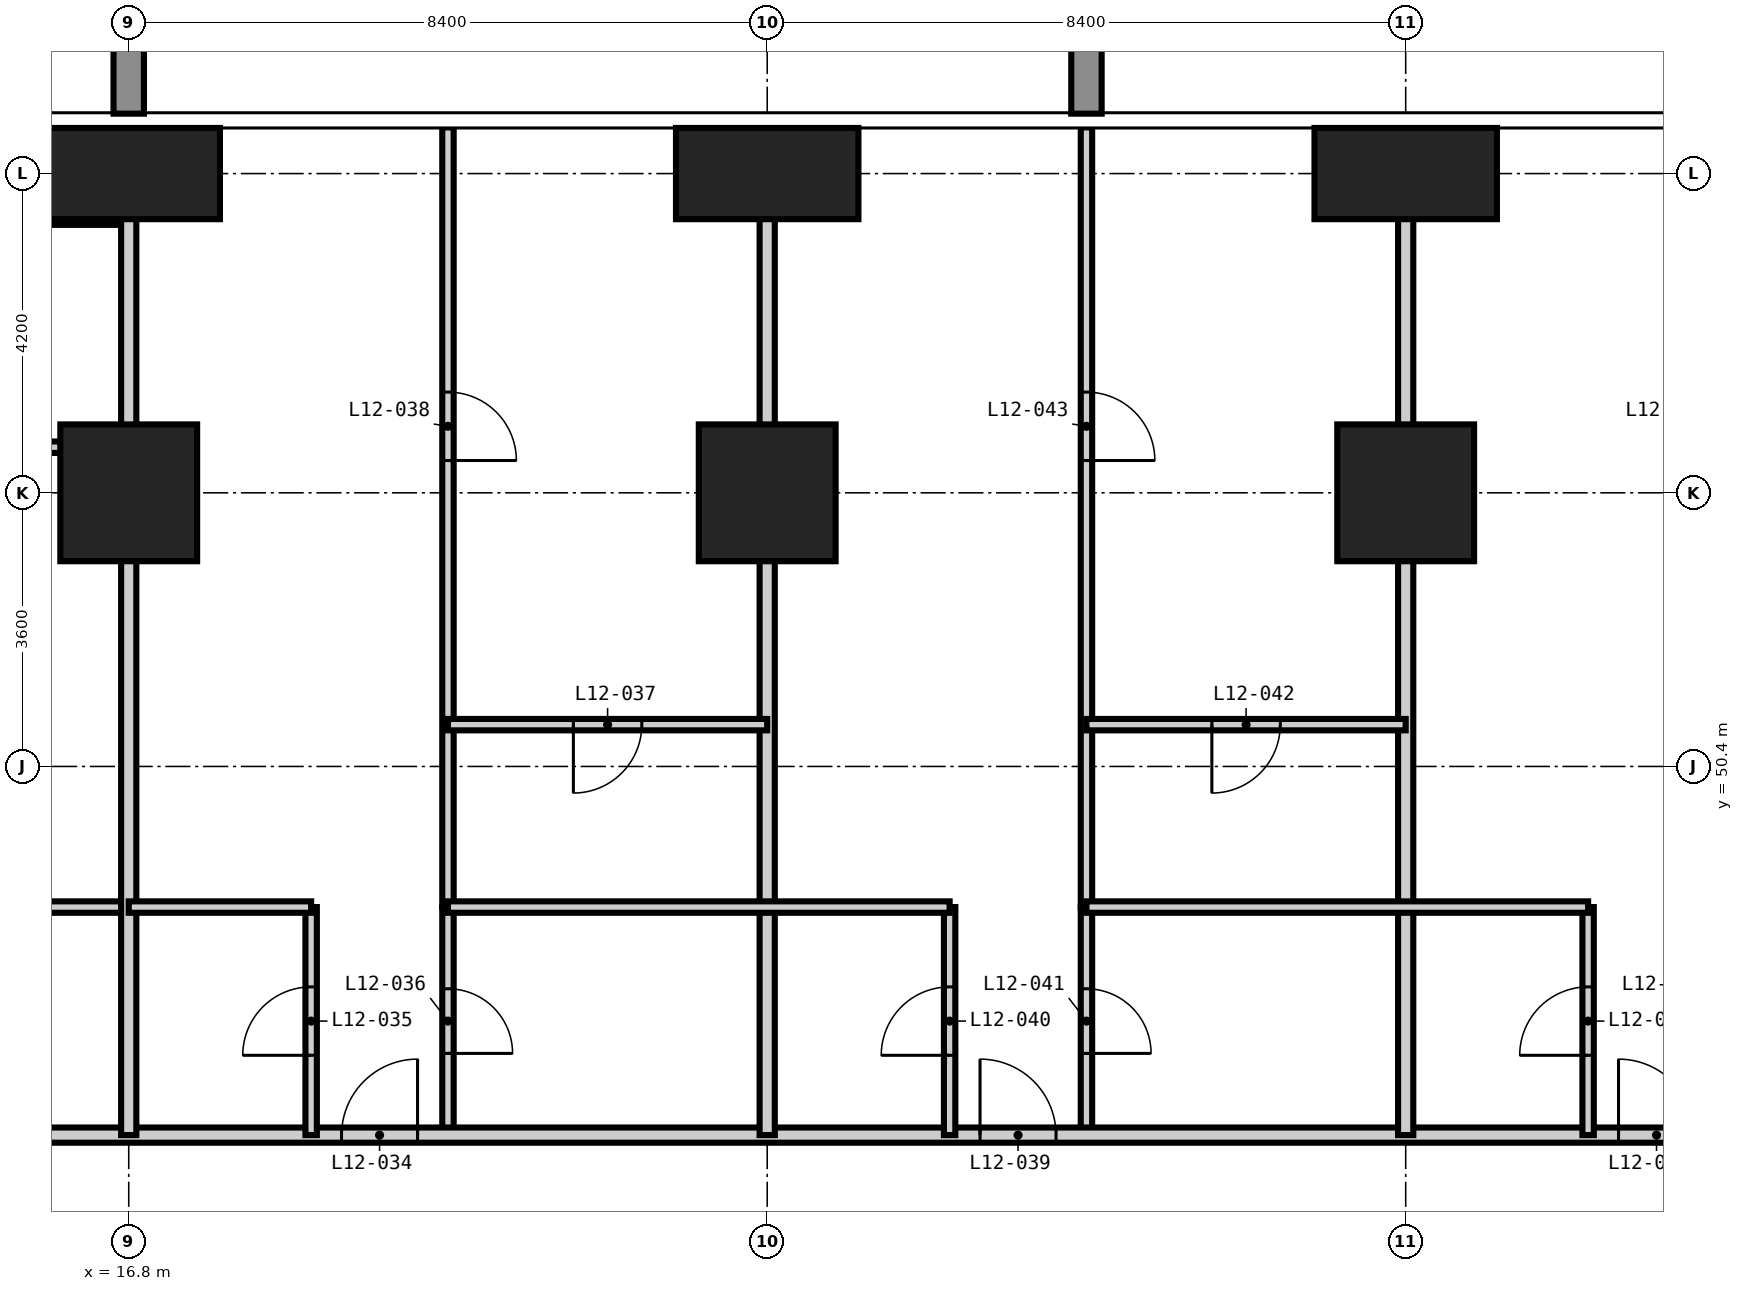
"""IFC4 building model, lengths in metres.
Left out: names, types, materials, properties, quantities, classifications, styles, units other than length and angle.
Written with IfcOpenShell. Run it as: python <this file> out.ifc"""

import sys

from ifc_helpers import new_model, si_unit, direction, frame, frame_2d, origin, origin_2d, place, context, subcontext, project, spatial, rectangle, extrude, element, fill, save


model = new_model("IFC4")
c1 = context("Model", 3, precision=1e-05, world=origin(), true_north=direction((0.0, 1.0)))
c2 = subcontext(c1, "Body", "Model", "MODEL_VIEW")
j1 = project(units=[si_unit("LENGTHUNIT", "METRE"), si_unit("PLANEANGLEUNIT", "RADIAN")], contexts=[c1])
p1 = place(None, origin())
s1 = spatial("IfcSite", under=j1, at=p1, CompositionType="ELEMENT")
p2 = place(p1, origin())
s2 = spatial("IfcBuilding", under=s1, at=p2, CompositionType="ELEMENT")
p3 = place(p2, frame((0.0, 0.0, 52.2)))
s3 = spatial("IfcBuildingStorey", under=s2, at=p3, CompositionType="ELEMENT", Elevation=52.2)
p4 = place(p3, frame((16.8, 54.0, -0.35), z_axis=(0.0, 0.0, 1.0), x_axis=(1.0, 0.0, 0.0)))
e1 = element("IfcColumn", 1, at=p4, inside=s3, PredefinedType="COLUMN", context=c2, shape_type="SweptSolid", body=[
    extrude(rectangle(XDim=1.8, YDim=1.8, at=origin_2d()), origin(), (0.0, 0.0, 1.0), 3.6),
])
p5 = place(p3, frame((16.8, 58.2, -0.35), z_axis=(0.0, 0.0, 1.0), x_axis=(1.0, 0.0, 0.0)))
e2 = element("IfcColumn", 2, at=p5, inside=s3, PredefinedType="COLUMN", context=c2, shape_type="SweptSolid", body=[
    extrude(rectangle(XDim=2.4, YDim=1.2, at=origin_2d()), origin(), (0.0, 0.0, 1.0), 3.6),
])
p6 = place(p3, frame((25.2, 54.0, -0.35), z_axis=(0.0, 0.0, 1.0), x_axis=(1.0, 0.0, 0.0)))
e3 = element("IfcColumn", 3, at=p6, inside=s3, PredefinedType="COLUMN", context=c2, shape_type="SweptSolid", body=[
    extrude(rectangle(XDim=1.8, YDim=1.8, at=origin_2d()), origin(), (0.0, 0.0, 1.0), 3.6),
])
p7 = place(p3, frame((25.2, 58.2, -0.35), z_axis=(0.0, 0.0, 1.0), x_axis=(1.0, 0.0, 0.0)))
e4 = element("IfcColumn", 4, at=p7, inside=s3, PredefinedType="COLUMN", context=c2, shape_type="SweptSolid", body=[
    extrude(rectangle(XDim=2.4, YDim=1.2, at=origin_2d()), origin(), (0.0, 0.0, 1.0), 3.6),
])
p8 = place(p3, frame((33.6, 54.0, -0.35), z_axis=(0.0, 0.0, 1.0), x_axis=(1.0, 0.0, 0.0)))
e5 = element("IfcColumn", 5, at=p8, inside=s3, PredefinedType="COLUMN", context=c2, shape_type="SweptSolid", body=[
    extrude(rectangle(XDim=1.8, YDim=1.8, at=origin_2d()), origin(), (0.0, 0.0, 1.0), 3.6),
])
p9 = place(p3, frame((33.6, 58.2, -0.35), z_axis=(0.0, 0.0, 1.0), x_axis=(1.0, 0.0, 0.0)))
e6 = element("IfcColumn", 6, at=p9, inside=s3, PredefinedType="COLUMN", context=c2, shape_type="SweptSolid", body=[
    extrude(rectangle(XDim=2.4, YDim=1.2, at=origin_2d()), origin(), (0.0, 0.0, 1.0), 3.6),
])
p10 = place(p3, frame((21.0, 45.55, 0.0), z_axis=(0.0, 0.0, 1.0), x_axis=(0.0, 1.0, 0.0)))
e7 = element("IfcWall", 7, at=p10, inside=s3, PredefinedType="PARTITIONING", context=c2, shape_type="SweptSolid", body=[
    extrude(rectangle(XDim=3.0, YDim=0.15, at=frame_2d((1.5, 0.0))), origin(), (0.0, 0.0, 1.0), 3.25),
])
p11 = place(p10, frame((1.075, 0.0, 0.0)))
e8 = element("IfcOpeningElement", 8, at=p11, cuts=e7, PredefinedType="OPENING", context=c2, shape_type="SweptSolid", body=[
    extrude(rectangle(XDim=0.85, YDim=2.1, at=frame_2d((0.425, 1.05))), frame((0.0, 0.085, 0.0), z_axis=(0.0, -1.0, 0.0), x_axis=(1.0, 0.0, 0.0)), (0.0, 0.0, 1.0), 0.17),
])
p12 = place(p3, frame((29.4, 45.55, 0.0), z_axis=(0.0, 0.0, 1.0), x_axis=(0.0, 1.0, 0.0)))
e9 = element("IfcWall", 9, at=p12, inside=s3, PredefinedType="PARTITIONING", context=c2, shape_type="SweptSolid", body=[
    extrude(rectangle(XDim=3.0, YDim=0.15, at=frame_2d((1.5, 0.0))), origin(), (0.0, 0.0, 1.0), 3.25),
])
p13 = place(p12, frame((1.075, 0.0, 0.0)))
e10 = element("IfcOpeningElement", 10, at=p13, cuts=e9, PredefinedType="OPENING", context=c2, shape_type="SweptSolid", body=[
    extrude(rectangle(XDim=0.85, YDim=2.1, at=frame_2d((0.425, 1.05))), frame((0.0, 0.085, 0.0), z_axis=(0.0, -1.0, 0.0), x_axis=(1.0, 0.0, 0.0)), (0.0, 0.0, 1.0), 0.17),
])
p14 = place(p3, frame((12.65, 48.55, 0.0), z_axis=(0.0, 0.0, 1.0), x_axis=(1.0, 0.0, 0.0)))
e11 = element("IfcWall", 11, at=p14, inside=s3, PredefinedType="PARTITIONING", context=c2, shape_type="SweptSolid", body=[
    extrude(rectangle(XDim=4.15, YDim=0.15, at=frame_2d((2.075, 0.0))), origin(), (0.0, 0.0, 1.0), 3.25),
])
p15 = place(p14, frame((1.65, 0.0, 0.0)))
e12 = element("IfcOpeningElement", 12, at=p15, cuts=e11, PredefinedType="OPENING", context=c2, shape_type="SweptSolid", body=[
    extrude(rectangle(XDim=0.85, YDim=2.1, at=frame_2d((0.425, 1.05))), frame((0.0, 0.085, 0.0), z_axis=(0.0, -1.0, 0.0), x_axis=(1.0, 0.0, 0.0)), (0.0, 0.0, 1.0), 0.17),
])
p16 = place(p3, frame((13.2, 57.6, 0.0), z_axis=(0.0, 0.0, 1.0), x_axis=(1.0, 0.0, 0.0)))
e13 = element("IfcWall", 13, at=p16, inside=s3, PredefinedType="PARTITIONING", context=c2, shape_type="SweptSolid", body=[
    extrude(rectangle(XDim=3.6, YDim=0.15, at=frame_2d((1.8, 0.0))), origin(), (0.0, 0.0, 1.0), 3.25),
])
p17 = place(p16, frame((1.375, 0.0, 0.0)))
e14 = element("IfcOpeningElement", 14, at=p17, cuts=e13, PredefinedType="OPENING", context=c2, shape_type="SweptSolid", body=[
    extrude(rectangle(XDim=0.85, YDim=2.1, at=frame_2d((0.425, 1.05))), frame((0.0, 0.085, 0.0), z_axis=(0.0, -1.0, 0.0), x_axis=(1.0, 0.0, 0.0)), (0.0, 0.0, 1.0), 0.17),
])
p18 = place(p3, frame((12.65, 45.55, 0.0), z_axis=(0.0, 0.0, 1.0), x_axis=(1.0, 0.0, 0.0)))
e15 = element("IfcWall", 15, at=p18, inside=s3, PredefinedType="PARTITIONING", context=c2, shape_type="SweptSolid", body=[
    extrude(rectangle(XDim=32.3, YDim=0.2, at=frame_2d((16.15, 0.0))), origin(), (0.0, 0.0, 1.0), 3.25),
])
p19 = place(p18, frame((6.95, 0.0, 0.0)))
e16 = element("IfcOpeningElement", 16, at=p19, cuts=e15, PredefinedType="OPENING", context=c2, shape_type="SweptSolid", body=[
    extrude(rectangle(XDim=1.0, YDim=2.2, at=frame_2d((0.5, 1.1))), frame((0.0, 0.11, 0.0), z_axis=(0.0, -1.0, 0.0), x_axis=(1.0, 0.0, 0.0)), (0.0, 0.0, 1.0), 0.22),
])
p20 = place(p18, frame((15.35, 0.0, 0.0)))
e17 = element("IfcOpeningElement", 17, at=p20, cuts=e15, PredefinedType="OPENING", context=c2, shape_type="SweptSolid", body=[
    extrude(rectangle(XDim=1.0, YDim=2.2, at=frame_2d((0.5, 1.1))), frame((0.0, 0.11, 0.0), z_axis=(0.0, -1.0, 0.0), x_axis=(1.0, 0.0, 0.0)), (0.0, 0.0, 1.0), 0.22),
])
p21 = place(p18, frame((23.75, 0.0, 0.0)))
e18 = element("IfcOpeningElement", 18, at=p21, cuts=e15, PredefinedType="OPENING", context=c2, shape_type="SweptSolid", body=[
    extrude(rectangle(XDim=1.0, YDim=2.2, at=frame_2d((0.5, 1.1))), frame((0.0, 0.11, 0.0), z_axis=(0.0, -1.0, 0.0), x_axis=(1.0, 0.0, 0.0)), (0.0, 0.0, 1.0), 0.22),
])
for number, where, z_axis, x_axis in (
    (19, (16.8, 45.55, 0.0), (0.0, 0.0, 1.0), (0.0, 1.0, 0.0)),
    (20, (25.2, 45.55, 0.0), (0.0, 0.0, 1.0), (0.0, 1.0, 0.0)),
    (21, (33.6, 45.55, 0.0), (0.0, 0.0, 1.0), (0.0, 1.0, 0.0)),
):
    element("IfcWall", number, at=place(p3, frame(where, z_axis=z_axis, x_axis=x_axis)), inside=s3, PredefinedType="PARTITIONING", context=c2, shape_type="SweptSolid", body=[
        extrude(rectangle(XDim=13.258, YDim=0.2, at=frame_2d((6.629, 0.0))), origin(), (0.0, 0.0, 1.0), 3.25),
    ])
p22 = place(p3, frame((19.2, 45.55, 0.0), z_axis=(0.0, 0.0, 1.0), x_axis=(0.0, 1.0, 0.0)))
e22 = element("IfcWall", 22, at=p22, inside=s3, PredefinedType="PARTITIONING", context=c2, shape_type="SweptSolid", body=[
    extrude(rectangle(XDim=3.0, YDim=0.15, at=frame_2d((1.5, 0.0))), origin(), (0.0, 0.0, 1.0), 3.25),
])
p23 = place(p22, frame((1.05, 0.0, 0.0)))
e23 = element("IfcOpeningElement", 23, at=p23, cuts=e22, PredefinedType="OPENING", context=c2, shape_type="SweptSolid", body=[
    extrude(rectangle(XDim=0.9, YDim=2.1, at=frame_2d((0.45, 1.05))), frame((0.0, 0.085, 0.0), z_axis=(0.0, -1.0, 0.0), x_axis=(1.0, 0.0, 0.0)), (0.0, 0.0, 1.0), 0.17),
])
p24 = place(p3, frame((21.0, 48.55, 0.0), z_axis=(0.0, 0.0, 1.0), x_axis=(0.0, 1.0, 0.0)))
e24 = element("IfcWall", 24, at=p24, inside=s3, PredefinedType="PARTITIONING", context=c2, shape_type="SweptSolid", body=[
    extrude(rectangle(XDim=10.258, YDim=0.15, at=frame_2d((5.129, 0.0))), origin(), (0.0, 0.0, 1.0), 3.25),
])
p25 = place(p24, frame((5.875, 0.0, 0.0)))
e25 = element("IfcOpeningElement", 25, at=p25, cuts=e24, PredefinedType="OPENING", context=c2, shape_type="SweptSolid", body=[
    extrude(rectangle(XDim=0.9, YDim=2.1, at=frame_2d((0.45, 1.05))), frame((0.0, 0.085, 0.0), z_axis=(0.0, -1.0, 0.0), x_axis=(1.0, 0.0, 0.0)), (0.0, 0.0, 1.0), 0.17),
])
p26 = place(p3, frame((27.6, 45.55, 0.0), z_axis=(0.0, 0.0, 1.0), x_axis=(0.0, 1.0, 0.0)))
e26 = element("IfcWall", 26, at=p26, inside=s3, PredefinedType="PARTITIONING", context=c2, shape_type="SweptSolid", body=[
    extrude(rectangle(XDim=3.0, YDim=0.15, at=frame_2d((1.5, 0.0))), origin(), (0.0, 0.0, 1.0), 3.25),
])
p27 = place(p26, frame((1.05, 0.0, 0.0)))
e27 = element("IfcOpeningElement", 27, at=p27, cuts=e26, PredefinedType="OPENING", context=c2, shape_type="SweptSolid", body=[
    extrude(rectangle(XDim=0.9, YDim=2.1, at=frame_2d((0.45, 1.05))), frame((0.0, 0.085, 0.0), z_axis=(0.0, -1.0, 0.0), x_axis=(1.0, 0.0, 0.0)), (0.0, 0.0, 1.0), 0.17),
])
p28 = place(p3, frame((29.4, 48.55, 0.0), z_axis=(0.0, 0.0, 1.0), x_axis=(0.0, 1.0, 0.0)))
e28 = element("IfcWall", 28, at=p28, inside=s3, PredefinedType="PARTITIONING", context=c2, shape_type="SweptSolid", body=[
    extrude(rectangle(XDim=10.258, YDim=0.15, at=frame_2d((5.129, 0.0))), origin(), (0.0, 0.0, 1.0), 3.25),
])
p29 = place(p28, frame((5.875, 0.0, 0.0)))
e29 = element("IfcOpeningElement", 29, at=p29, cuts=e28, PredefinedType="OPENING", context=c2, shape_type="SweptSolid", body=[
    extrude(rectangle(XDim=0.9, YDim=2.1, at=frame_2d((0.45, 1.05))), frame((0.0, 0.085, 0.0), z_axis=(0.0, -1.0, 0.0), x_axis=(1.0, 0.0, 0.0)), (0.0, 0.0, 1.0), 0.17),
])
p30 = place(p3, frame((36.0, 45.55, 0.0), z_axis=(0.0, 0.0, 1.0), x_axis=(0.0, 1.0, 0.0)))
e30 = element("IfcWall", 30, at=p30, inside=s3, PredefinedType="PARTITIONING", context=c2, shape_type="SweptSolid", body=[
    extrude(rectangle(XDim=3.0, YDim=0.15, at=frame_2d((1.5, 0.0))), origin(), (0.0, 0.0, 1.0), 3.25),
])
p31 = place(p30, frame((1.05, 0.0, 0.0)))
e31 = element("IfcOpeningElement", 31, at=p31, cuts=e30, PredefinedType="OPENING", context=c2, shape_type="SweptSolid", body=[
    extrude(rectangle(XDim=0.9, YDim=2.1, at=frame_2d((0.45, 1.05))), frame((0.0, 0.085, 0.0), z_axis=(0.0, -1.0, 0.0), x_axis=(1.0, 0.0, 0.0)), (0.0, 0.0, 1.0), 0.17),
])
p32 = place(p3, frame((16.8, 48.55, 0.0), z_axis=(0.0, 0.0, 1.0), x_axis=(1.0, 0.0, 0.0)))
e32 = element("IfcWall", 32, at=p32, inside=s3, PredefinedType="PARTITIONING", context=c2, shape_type="SweptSolid", body=[
    extrude(rectangle(XDim=2.4, YDim=0.15, at=frame_2d((1.2, 0.0))), origin(), (0.0, 0.0, 1.0), 3.25),
])
for number, where, z_axis, x_axis in (
    (33, (21.0, 48.55, 0.0), (0.0, 0.0, 1.0), (1.0, 0.0, 0.0)),
    (34, (29.4, 48.55, 0.0), (0.0, 0.0, 1.0), (1.0, 0.0, 0.0)),
):
    element("IfcWall", number, at=place(p3, frame(where, z_axis=z_axis, x_axis=x_axis)), inside=s3, PredefinedType="PARTITIONING", context=c2, shape_type="SweptSolid", body=[
        extrude(rectangle(XDim=6.6, YDim=0.15, at=frame_2d((3.3, 0.0))), origin(), (0.0, 0.0, 1.0), 3.25),
    ])
p33 = place(p3, frame((21.0, 50.95, 0.0), z_axis=(0.0, 0.0, 1.0), x_axis=(1.0, 0.0, 0.0)))
e35 = element("IfcWall", 35, at=p33, inside=s3, PredefinedType="PARTITIONING", context=c2, shape_type="SweptSolid", body=[
    extrude(rectangle(XDim=4.2, YDim=0.15, at=frame_2d((2.1, 0.0))), origin(), (0.0, 0.0, 1.0), 3.25),
])
p34 = place(p33, frame((1.65, 0.0, 0.0)))
e36 = element("IfcOpeningElement", 36, at=p34, cuts=e35, PredefinedType="OPENING", context=c2, shape_type="SweptSolid", body=[
    extrude(rectangle(XDim=0.9, YDim=2.1, at=frame_2d((0.45, 1.05))), frame((0.0, 0.085, 0.0), z_axis=(0.0, -1.0, 0.0), x_axis=(1.0, 0.0, 0.0)), (0.0, 0.0, 1.0), 0.17),
])
p35 = place(p3, frame((29.4, 50.95, 0.0), z_axis=(0.0, 0.0, 1.0), x_axis=(1.0, 0.0, 0.0)))
e37 = element("IfcWall", 37, at=p35, inside=s3, PredefinedType="PARTITIONING", context=c2, shape_type="SweptSolid", body=[
    extrude(rectangle(XDim=4.2, YDim=0.15, at=frame_2d((2.1, 0.0))), origin(), (0.0, 0.0, 1.0), 3.25),
])
p36 = place(p35, frame((1.65, 0.0, 0.0)))
e38 = element("IfcOpeningElement", 38, at=p36, cuts=e37, PredefinedType="OPENING", context=c2, shape_type="SweptSolid", body=[
    extrude(rectangle(XDim=0.9, YDim=2.1, at=frame_2d((0.45, 1.05))), frame((0.0, 0.085, 0.0), z_axis=(0.0, -1.0, 0.0), x_axis=(1.0, 0.0, 0.0)), (0.0, 0.0, 1.0), 0.17),
])
p37 = place(p3, frame((-0.008, 54.6, 0.0), z_axis=(0.0, 0.0, 1.0), x_axis=(1.0, 0.0, 0.0)))
e39 = element("IfcWall", 39, at=p37, inside=s3, PredefinedType="PARTITIONING", context=c2, shape_type="SweptSolid", body=[
    extrude(rectangle(XDim=16.808, YDim=0.15, at=frame_2d((8.404, 0.0))), origin(), (0.0, 0.0, 1.0), 3.25),
])
p38 = place(p37, frame((4.958, 0.0, 0.0)))
e40 = element("IfcOpeningElement", 40, at=p38, cuts=e39, PredefinedType="OPENING", context=c2, shape_type="SweptSolid", body=[
    extrude(rectangle(XDim=0.9, YDim=2.1, at=frame_2d((0.45, 1.05))), frame((0.0, 0.085, 0.0), z_axis=(0.0, -1.0, 0.0), x_axis=(1.0, 0.0, 0.0)), (0.0, 0.0, 1.0), 0.17),
])
p39 = place(p19, origin())
e41 = element("IfcDoor", 41, at=p39, inside=s3, OperationType="SINGLE_SWING_RIGHT", PredefinedType="DOOR", context=c2, shape_type="SweptSolid", body=[
    extrude(rectangle(XDim=1.0, YDim=2.2, at=frame_2d((0.5, 1.1))), frame((0.0, 0.025, 0.0), z_axis=(0.0, -1.0, 0.0), x_axis=(1.0, 0.0, 0.0)), (0.0, 0.0, 1.0), 0.05),
])
fill(e16, e41)
p40 = place(p23, origin())
e42 = element("IfcDoor", 42, at=p40, inside=s3, OperationType="SINGLE_SWING_LEFT", PredefinedType="DOOR", context=c2, shape_type="SweptSolid", body=[
    extrude(rectangle(XDim=0.9, YDim=2.1, at=frame_2d((0.45, 1.05))), frame((0.0, 0.025, 0.0), z_axis=(0.0, -1.0, 0.0), x_axis=(1.0, 0.0, 0.0)), (0.0, 0.0, 1.0), 0.05),
])
fill(e23, e42)
p41 = place(p11, frame((0.85, 0.0, 0.0), z_axis=(0.0, 0.0, 1.0), x_axis=(-1.0, 0.0, 0.0)))
e43 = element("IfcDoor", 43, at=p41, inside=s3, OperationType="SINGLE_SWING_RIGHT", PredefinedType="DOOR", context=c2, shape_type="SweptSolid", body=[
    extrude(rectangle(XDim=0.85, YDim=2.1, at=frame_2d((0.425, 1.05))), frame((0.0, 0.025, 0.0), z_axis=(0.0, -1.0, 0.0), x_axis=(1.0, 0.0, 0.0)), (0.0, 0.0, 1.0), 0.05),
])
fill(e8, e43)
p42 = place(p34, frame((0.9, 0.0, 0.0), z_axis=(0.0, 0.0, 1.0), x_axis=(-1.0, 0.0, 0.0)))
e44 = element("IfcDoor", 44, at=p42, inside=s3, OperationType="SINGLE_SWING_RIGHT", PredefinedType="DOOR", context=c2, shape_type="SweptSolid", body=[
    extrude(rectangle(XDim=0.9, YDim=2.1, at=frame_2d((0.45, 1.05))), frame((0.0, 0.025, 0.0), z_axis=(0.0, -1.0, 0.0), x_axis=(1.0, 0.0, 0.0)), (0.0, 0.0, 1.0), 0.05),
])
fill(e36, e44)
p43 = place(p25, frame((0.9, 0.0, 0.0), z_axis=(0.0, 0.0, 1.0), x_axis=(-1.0, 0.0, 0.0)))
e45 = element("IfcDoor", 45, at=p43, inside=s3, OperationType="SINGLE_SWING_RIGHT", PredefinedType="DOOR", context=c2, shape_type="SweptSolid", body=[
    extrude(rectangle(XDim=0.9, YDim=2.1, at=frame_2d((0.45, 1.05))), frame((0.0, 0.025, 0.0), z_axis=(0.0, -1.0, 0.0), x_axis=(1.0, 0.0, 0.0)), (0.0, 0.0, 1.0), 0.05),
])
fill(e25, e45)
p44 = place(p20, origin())
e46 = element("IfcDoor", 46, at=p44, inside=s3, OperationType="SINGLE_SWING_LEFT", PredefinedType="DOOR", context=c2, shape_type="SweptSolid", body=[
    extrude(rectangle(XDim=1.0, YDim=2.2, at=frame_2d((0.5, 1.1))), frame((0.0, 0.025, 0.0), z_axis=(0.0, -1.0, 0.0), x_axis=(1.0, 0.0, 0.0)), (0.0, 0.0, 1.0), 0.05),
])
fill(e17, e46)
p45 = place(p27, origin())
e47 = element("IfcDoor", 47, at=p45, inside=s3, OperationType="SINGLE_SWING_LEFT", PredefinedType="DOOR", context=c2, shape_type="SweptSolid", body=[
    extrude(rectangle(XDim=0.9, YDim=2.1, at=frame_2d((0.45, 1.05))), frame((0.0, 0.025, 0.0), z_axis=(0.0, -1.0, 0.0), x_axis=(1.0, 0.0, 0.0)), (0.0, 0.0, 1.0), 0.05),
])
fill(e27, e47)
p46 = place(p13, frame((0.85, 0.0, 0.0), z_axis=(0.0, 0.0, 1.0), x_axis=(-1.0, 0.0, 0.0)))
e48 = element("IfcDoor", 48, at=p46, inside=s3, OperationType="SINGLE_SWING_RIGHT", PredefinedType="DOOR", context=c2, shape_type="SweptSolid", body=[
    extrude(rectangle(XDim=0.85, YDim=2.1, at=frame_2d((0.425, 1.05))), frame((0.0, 0.025, 0.0), z_axis=(0.0, -1.0, 0.0), x_axis=(1.0, 0.0, 0.0)), (0.0, 0.0, 1.0), 0.05),
])
fill(e10, e48)
p47 = place(p36, frame((0.9, 0.0, 0.0), z_axis=(0.0, 0.0, 1.0), x_axis=(-1.0, 0.0, 0.0)))
e49 = element("IfcDoor", 49, at=p47, inside=s3, OperationType="SINGLE_SWING_RIGHT", PredefinedType="DOOR", context=c2, shape_type="SweptSolid", body=[
    extrude(rectangle(XDim=0.9, YDim=2.1, at=frame_2d((0.45, 1.05))), frame((0.0, 0.025, 0.0), z_axis=(0.0, -1.0, 0.0), x_axis=(1.0, 0.0, 0.0)), (0.0, 0.0, 1.0), 0.05),
])
fill(e38, e49)
p48 = place(p29, frame((0.9, 0.0, 0.0), z_axis=(0.0, 0.0, 1.0), x_axis=(-1.0, 0.0, 0.0)))
e50 = element("IfcDoor", 50, at=p48, inside=s3, OperationType="SINGLE_SWING_RIGHT", PredefinedType="DOOR", context=c2, shape_type="SweptSolid", body=[
    extrude(rectangle(XDim=0.9, YDim=2.1, at=frame_2d((0.45, 1.05))), frame((0.0, 0.025, 0.0), z_axis=(0.0, -1.0, 0.0), x_axis=(1.0, 0.0, 0.0)), (0.0, 0.0, 1.0), 0.05),
])
fill(e29, e50)
p49 = place(p21, origin())
e51 = element("IfcDoor", 51, at=p49, inside=s3, OperationType="SINGLE_SWING_LEFT", PredefinedType="DOOR", context=c2, shape_type="SweptSolid", body=[
    extrude(rectangle(XDim=1.0, YDim=2.2, at=frame_2d((0.5, 1.1))), frame((0.0, 0.025, 0.0), z_axis=(0.0, -1.0, 0.0), x_axis=(1.0, 0.0, 0.0)), (0.0, 0.0, 1.0), 0.05),
])
fill(e18, e51)
p50 = place(p31, origin())
e52 = element("IfcDoor", 52, at=p50, inside=s3, OperationType="SINGLE_SWING_LEFT", PredefinedType="DOOR", context=c2, shape_type="SweptSolid", body=[
    extrude(rectangle(XDim=0.9, YDim=2.1, at=frame_2d((0.45, 1.05))), frame((0.0, 0.025, 0.0), z_axis=(0.0, -1.0, 0.0), x_axis=(1.0, 0.0, 0.0)), (0.0, 0.0, 1.0), 0.05),
])
fill(e31, e52)
save(model, sys.argv[1])
